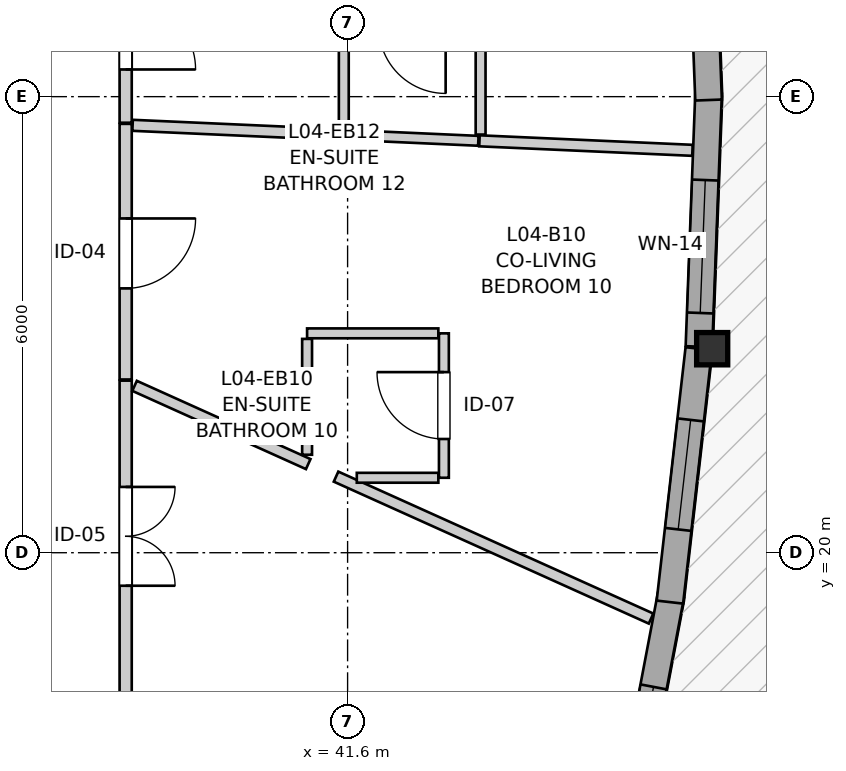
"""IFC4 building model, lengths in metres.
Left out: names, types, materials, properties, quantities, classifications, styles, units other than length and angle.
Written with IfcOpenShell. Run it as: python <this file> out.ifc"""

import sys

from ifc_helpers import new_model, si_unit, direction, frame, frame_2d, origin, origin_2d, place, context, subcontext, project, spatial, rectangle, i_section, extrude, source, transform, mapped, element, fill, save


model = new_model("IFC4")
c1 = context("Model", 3, precision=1e-05, world=origin(), true_north=direction((0.0, 1.0)))
c2 = subcontext(c1, "Body", "Model", "MODEL_VIEW")
j1 = project(units=[si_unit("LENGTHUNIT", "METRE"), si_unit("PLANEANGLEUNIT", "RADIAN")], contexts=[c1])
p1 = place(None, origin())
s1 = spatial("IfcSite", under=j1, at=p1, CompositionType="ELEMENT")
p2 = place(p1, origin())
s2 = spatial("IfcBuilding", under=s1, at=p2, CompositionType="ELEMENT")
p3 = place(p2, frame((0.0, 0.0, 17.4)))
s3 = spatial("IfcBuildingStorey", under=s2, at=p3, CompositionType="ELEMENT", Elevation=17.4)
m1 = source(origin(), c2, "Body", "SweptSolid", [
    extrude(i_section(OverallWidth=0.409, OverallDepth=0.425, WebThickness=0.03, FlangeThickness=0.048, FilletRadius=0.015, at=origin_2d()), origin(), (0.0, 0.0, 1.0), 2.94),
])
p4 = place(p3, frame((46.397, 22.684, 0.0), z_axis=(0.0, 0.0, 1.0), x_axis=(1.0, 0.0, 0.0)))
e1 = element("IfcColumn", 1, at=p4, inside=s3, PredefinedType="PILASTER", context=c2, shape_type="MappedRepresentation", body=[
    mapped(m1, transform((0.0, 0.0, 0.0), x_axis=(1.0, 0.0, 0.0), y_axis=(0.0, 1.0, 0.0), z_axis=(0.0, 0.0, 1.0), scale=1.0)),
])
p5 = place(p3, frame((45.273, 16.379, 0.0), z_axis=(0.0, 0.0, 1.0), x_axis=(0.186712111557, 0.982414671815, 0.0)))
e2 = element("IfcWall", 2, at=p5, inside=s3, PredefinedType="SOLIDWALL", context=c2, shape_type="SweptSolid", body=[
    extrude(rectangle(XDim=3.113, YDim=0.35, at=frame_2d((1.557, 0.0))), origin(), (0.0, 0.0, 1.0), 2.42),
])
p6 = place(p5, frame((0.939, 0.0, 0.82)))
e3 = element("IfcOpeningElement", 3, at=p6, cuts=e2, PredefinedType="OPENING", context=c2, shape_type="SweptSolid", body=[
    extrude(rectangle(XDim=0.95, YDim=1.35, at=frame_2d((0.475, 0.675))), frame((0.0, 0.185, 0.0), z_axis=(0.0, -1.0, 0.0), x_axis=(1.0, 0.0, 0.0)), (0.0, 0.0, 1.0), 0.37),
])
p7 = place(p3, frame((45.841, 19.35, 0.0), z_axis=(0.0, 0.0, 1.0), x_axis=(0.113290074291, 0.993561955324, 0.0)))
e4 = element("IfcWall", 4, at=p7, inside=s3, PredefinedType="SOLIDWALL", context=c2, shape_type="SweptSolid", body=[
    extrude(rectangle(XDim=3.355, YDim=0.35, at=frame_2d((1.678, 0.0))), origin(), (0.0, 0.0, 1.0), 2.42),
])
p8 = place(p7, frame((0.963, 0.0, 0.82)))
e5 = element("IfcOpeningElement", 5, at=p8, cuts=e4, PredefinedType="OPENING", context=c2, shape_type="SweptSolid", body=[
    extrude(rectangle(XDim=1.45, YDim=1.25, at=frame_2d((0.725, 0.625))), frame((0.0, 0.185, 0.0), z_axis=(0.0, -1.0, 0.0), x_axis=(1.0, 0.0, 0.0)), (0.0, 0.0, 1.0), 0.37),
])
p9 = place(p3, frame((46.223, 22.711, 0.0), z_axis=(0.0, 0.0, 1.0), x_axis=(0.037977854684, 0.999278581054, 0.0)))
e6 = element("IfcWall", 6, at=p9, inside=s3, PredefinedType="SOLIDWALL", context=c2, shape_type="SweptSolid", body=[
    extrude(rectangle(XDim=3.336, YDim=0.35, at=frame_2d((1.668, 0.0))), origin(), (0.0, 0.0, 1.0), 2.42),
])
p10 = place(p9, frame((0.444, 0.0, 0.82)))
e7 = element("IfcOpeningElement", 7, at=p10, cuts=e6, PredefinedType="OPENING", context=c2, shape_type="SweptSolid", body=[
    extrude(rectangle(XDim=1.75, YDim=1.3, at=frame_2d((0.875, 0.65))), frame((0.0, 0.185, 0.0), z_axis=(0.0, -1.0, 0.0), x_axis=(1.0, 0.0, 0.0)), (0.0, 0.0, 1.0), 0.37),
])
p11 = place(p3, frame((46.349, 25.955, 0.0), z_axis=(0.0, 0.0, 1.0), x_axis=(-0.038022046735, 0.999276900545, 0.0)))
e8 = element("IfcWall", 8, at=p11, inside=s3, PredefinedType="SOLIDWALL", context=c2, shape_type="SweptSolid", body=[
    extrude(rectangle(XDim=3.056, YDim=0.35, at=frame_2d((1.528, 0.0))), origin(), (0.0, 0.0, 1.0), 2.42),
])
p12 = place(p11, frame((0.808, 0.0, 0.82)))
e9 = element("IfcOpeningElement", 9, at=p12, cuts=e8, PredefinedType="OPENING", context=c2, shape_type="SweptSolid", body=[
    extrude(rectangle(XDim=1.45, YDim=1.25, at=frame_2d((0.725, 0.625))), frame((0.0, 0.185, 0.0), z_axis=(0.0, -1.0, 0.0), x_axis=(1.0, 0.0, 0.0)), (0.0, 0.0, 1.0), 0.37),
])
p13 = place(p3, frame((38.68, 22.264, 0.0), z_axis=(0.0, 0.0, 1.0), x_axis=(0.0, -1.0, 0.0)))
e10 = element("IfcWall", 10, at=p13, inside=s3, PredefinedType="PARTITIONING", context=c2, shape_type="SweptSolid", body=[
    extrude(rectangle(XDim=4.102, YDim=0.16, at=frame_2d((2.051, 0.0))), origin(), (0.0, 0.0, 1.0), 2.94),
])
p14 = place(p13, frame((1.398, 0.0, 0.0)))
e11 = element("IfcOpeningElement", 11, at=p14, cuts=e10, PredefinedType="OPENING", context=c2, shape_type="SweptSolid", body=[
    extrude(rectangle(XDim=1.3, YDim=2.1, at=frame_2d((0.65, 1.05))), frame((0.0, 0.09, 0.0), z_axis=(0.0, -1.0, 0.0), x_axis=(1.0, 0.0, 0.0)), (0.0, 0.0, 1.0), 0.18),
])
p15 = place(p3, frame((38.68, 25.642, 0.0), z_axis=(0.0, 0.0, 1.0), x_axis=(0.0, -1.0, 0.0)))
e12 = element("IfcWall", 12, at=p15, inside=s3, PredefinedType="PARTITIONING", context=c2, shape_type="SweptSolid", body=[
    extrude(rectangle(XDim=3.363, YDim=0.16, at=frame_2d((1.682, 0.0))), origin(), (0.0, 0.0, 1.0), 2.94),
])
p16 = place(p15, frame((1.244, 0.0, 0.0)))
e13 = element("IfcOpeningElement", 13, at=p16, cuts=e12, PredefinedType="OPENING", context=c2, shape_type="SweptSolid", body=[
    extrude(rectangle(XDim=0.92, YDim=2.1, at=frame_2d((0.46, 1.05))), frame((0.0, 0.09, 0.0), z_axis=(0.0, -1.0, 0.0), x_axis=(1.0, 0.0, 0.0)), (0.0, 0.0, 1.0), 0.18),
])
p17 = place(p3, frame((38.68, 27.978, 0.0), z_axis=(0.0, 0.0, 1.0), x_axis=(0.0, -1.0, 0.0)))
e14 = element("IfcWall", 14, at=p17, inside=s3, PredefinedType="PARTITIONING", context=c2, shape_type="SweptSolid", body=[
    extrude(rectangle(XDim=2.321, YDim=0.16, at=frame_2d((1.161, 0.0))), origin(), (0.0, 0.0, 1.0), 2.94),
])
p18 = place(p17, frame((0.7, 0.0, 0.0)))
e15 = element("IfcOpeningElement", 15, at=p18, cuts=e14, PredefinedType="OPENING", context=c2, shape_type="SweptSolid", body=[
    extrude(rectangle(XDim=0.92, YDim=2.1, at=frame_2d((0.46, 1.05))), frame((0.0, 0.09, 0.0), z_axis=(0.0, -1.0, 0.0), x_axis=(1.0, 0.0, 0.0)), (0.0, 0.0, 1.0), 0.18),
])
p19 = place(p3, frame((42.867, 20.986, 0.0), z_axis=(0.0, 0.0, 1.0), x_axis=(0.0, 1.0, 0.0)))
e16 = element("IfcWall", 16, at=p19, inside=s3, PredefinedType="PARTITIONING", context=c2, shape_type="SweptSolid", body=[
    extrude(rectangle(XDim=1.9, YDim=0.13, at=frame_2d((0.95, 0.0))), origin(), (0.0, 0.0, 1.0), 2.508),
])
p20 = place(p19, frame((0.51, 0.0, 0.0)))
e17 = element("IfcOpeningElement", 17, at=p20, cuts=e16, PredefinedType="OPENING", context=c2, shape_type="SweptSolid", body=[
    extrude(rectangle(XDim=0.88, YDim=2.05, at=frame_2d((0.44, 1.025))), frame((0.0, 0.075, 0.0), z_axis=(0.0, -1.0, 0.0), x_axis=(1.0, 0.0, 0.0)), (0.0, 0.0, 1.0), 0.15),
])
p21 = place(p3, frame((41.448, 21.001, 0.0), z_axis=(0.0, 0.0, 1.0), x_axis=(0.911733501253, -0.410782208346, 0.0)))
e18 = element("IfcWall", 18, at=p21, inside=s3, PredefinedType="PARTITIONING", context=c2, shape_type="SweptSolid", body=[
    extrude(rectangle(XDim=4.546, YDim=0.145, at=frame_2d((2.273, 0.0))), origin(), (0.0, 0.0, 1.0), 2.94),
])
p22 = place(p3, frame((38.771, 25.623, 0.0), z_axis=(0.0, 0.0, 1.0), x_axis=(0.999004404192, -0.044611662199, 0.0)))
e19 = element("IfcWall", 19, at=p22, inside=s3, PredefinedType="PARTITIONING", context=c2, shape_type="SweptSolid", body=[
    extrude(rectangle(XDim=2.796, YDim=0.145, at=frame_2d((1.398, 0.0))), origin(), (0.0, 0.0, 1.0), 2.94),
])
p23 = place(p3, frame((43.335, 25.419, 0.0), z_axis=(0.0, 0.0, 1.0), x_axis=(0.999002708223, -0.04464962444, 0.0)))
e20 = element("IfcWall", 20, at=p23, inside=s3, PredefinedType="PARTITIONING", context=c2, shape_type="SweptSolid", body=[
    extrude(rectangle(XDim=2.805, YDim=0.145, at=frame_2d((1.402, 0.0))), origin(), (0.0, 0.0, 1.0), 2.94),
])
p24 = place(p3, frame((38.797, 22.195, 0.0), z_axis=(0.0, 0.0, 1.0), x_axis=(0.911759201305, -0.410725162165, 0.0)))
e21 = element("IfcWall", 21, at=p24, inside=s3, PredefinedType="PARTITIONING", context=c2, shape_type="SweptSolid", body=[
    extrude(rectangle(XDim=2.506, YDim=0.145, at=frame_2d((1.253, 0.0))), origin(), (0.0, 0.0, 1.0), 2.94),
])
p25 = place(p3, frame((41.067, 22.886, 0.0), z_axis=(0.0, 0.0, 1.0), x_axis=(1.0, 0.0, 0.0)))
e22 = element("IfcWall", 22, at=p25, inside=s3, PredefinedType="PARTITIONING", context=c2, shape_type="SweptSolid", body=[
    extrude(rectangle(XDim=1.727, YDim=0.13, at=frame_2d((0.864, 0.0))), origin(), (0.0, 0.0, 1.0), 2.94),
])
p26 = place(p3, frame((41.58, 25.497, 0.0), z_axis=(0.0, 0.0, 1.0), x_axis=(0.998993531001, -0.04485448715, 0.0)))
e23 = element("IfcWall", 23, at=p26, inside=s3, PredefinedType="PARTITIONING", context=c2, shape_type="SweptSolid", body=[
    extrude(rectangle(XDim=1.742, YDim=0.13, at=frame_2d((0.871, 0.0))), origin(), (0.0, 0.0, 1.0), 2.94),
])
p27 = place(p3, frame((41.067, 21.289, 0.0), z_axis=(0.0, 0.0, 1.0), x_axis=(0.0, 1.0, 0.0)))
e24 = element("IfcWall", 24, at=p27, inside=s3, PredefinedType="PARTITIONING", context=c2, shape_type="SweptSolid", body=[
    extrude(rectangle(XDim=1.524, YDim=0.13, at=frame_2d((0.762, 0.0))), origin(), (0.0, 0.0, 1.0), 2.94),
])
p28 = place(p3, frame((43.35, 25.501, 0.0), z_axis=(0.0, 0.0, 1.0), x_axis=(0.0, 1.0, 0.0)))
e25 = element("IfcWall", 25, at=p28, inside=s3, PredefinedType="PARTITIONING", context=c2, shape_type="SweptSolid", body=[
    extrude(rectangle(XDim=1.348, YDim=0.13, at=frame_2d((0.674, 0.0))), origin(), (0.0, 0.0, 1.0), 2.508),
])
p29 = place(p3, frame((41.55, 25.583, 0.0), z_axis=(0.0, 0.0, 1.0), x_axis=(0.0, 1.0, 0.0)))
e26 = element("IfcWall", 26, at=p29, inside=s3, PredefinedType="PARTITIONING", context=c2, shape_type="SweptSolid", body=[
    extrude(rectangle(XDim=1.267, YDim=0.13, at=frame_2d((0.633, 0.0))), origin(), (0.0, 0.0, 1.0), 2.94),
])
p30 = place(p3, frame((41.721, 20.986, 0.0), z_axis=(0.0, 0.0, 1.0), x_axis=(1.0, 0.0, 0.0)))
e27 = element("IfcWall", 27, at=p30, inside=s3, PredefinedType="PARTITIONING", context=c2, shape_type="SweptSolid", body=[
    extrude(rectangle(XDim=1.073, YDim=0.13, at=frame_2d((0.537, 0.0))), origin(), (0.0, 0.0, 1.0), 2.94),
])
m2 = source(origin(), c2, "Body", "SweptSolid", [
    extrude(rectangle(XDim=0.95, YDim=1.35, at=frame_2d((0.475, 0.675))), frame((0.0, 0.03, 0.0), z_axis=(0.0, -1.0, 0.0), x_axis=(1.0, 0.0, 0.0)), (0.0, 0.0, 1.0), 0.06),
])
p31 = place(p6, origin())
e28 = element("IfcWindow", 28, at=p31, inside=s3, PartitioningType="SINGLE_PANEL", PredefinedType="WINDOW", context=c2, shape_type="MappedRepresentation", body=[
    mapped(m2, transform((0.0, 0.0, 0.0), x_axis=(1.0, 0.0, 0.0), y_axis=(0.0, 1.0, 0.0), z_axis=(0.0, 0.0, 1.0), scale=1.0)),
])
fill(e3, e28)
m3 = source(origin(), c2, "Body", "SweptSolid", [
    extrude(rectangle(XDim=1.45, YDim=1.25, at=frame_2d((0.725, 0.625))), frame((0.0, 0.03, 0.0), z_axis=(0.0, -1.0, 0.0), x_axis=(1.0, 0.0, 0.0)), (0.0, 0.0, 1.0), 0.06),
])
p32 = place(p8, origin())
e29 = element("IfcWindow", 29, at=p32, inside=s3, PartitioningType="SINGLE_PANEL", PredefinedType="WINDOW", context=c2, shape_type="MappedRepresentation", body=[
    mapped(m3, transform((0.0, 0.0, 0.0), x_axis=(1.0, 0.0, 0.0), y_axis=(0.0, 1.0, 0.0), z_axis=(0.0, 0.0, 1.0), scale=1.0)),
])
fill(e5, e29)
m4 = source(origin(), c2, "Body", "SweptSolid", [
    extrude(rectangle(XDim=1.75, YDim=1.3, at=frame_2d((0.875, 0.65))), frame((0.0, 0.03, 0.0), z_axis=(0.0, -1.0, 0.0), x_axis=(1.0, 0.0, 0.0)), (0.0, 0.0, 1.0), 0.06),
])
p33 = place(p10, origin())
e30 = element("IfcWindow", 30, at=p33, inside=s3, PartitioningType="SINGLE_PANEL", PredefinedType="WINDOW", context=c2, shape_type="MappedRepresentation", body=[
    mapped(m4, transform((0.0, 0.0, 0.0), x_axis=(1.0, 0.0, 0.0), y_axis=(0.0, 1.0, 0.0), z_axis=(0.0, 0.0, 1.0), scale=1.0)),
])
fill(e7, e30)
m5 = source(origin(), c2, "Body", "SweptSolid", [
    extrude(rectangle(XDim=1.3, YDim=2.1, at=frame_2d((0.65, 1.05))), frame((0.0, 0.025, 0.0), z_axis=(0.0, -1.0, 0.0), x_axis=(1.0, 0.0, 0.0)), (0.0, 0.0, 1.0), 0.05),
])
p34 = place(p14, origin())
e31 = element("IfcDoor", 31, at=p34, inside=s3, OperationType="DOUBLE_DOOR_SINGLE_SWING", PredefinedType="DOOR", context=c2, shape_type="MappedRepresentation", body=[
    mapped(m5, transform((0.0, 0.0, 0.0), x_axis=(1.0, 0.0, 0.0), y_axis=(0.0, 1.0, 0.0), z_axis=(0.0, 0.0, 1.0), scale=1.0)),
])
fill(e11, e31)
m6 = source(origin(), c2, "Body", "SweptSolid", [
    extrude(rectangle(XDim=0.92, YDim=2.1, at=frame_2d((0.46, 1.05))), frame((0.0, 0.025, 0.0), z_axis=(0.0, -1.0, 0.0), x_axis=(1.0, 0.0, 0.0)), (0.0, 0.0, 1.0), 0.05),
])
p35 = place(p16, origin())
e32 = element("IfcDoor", 32, at=p35, inside=s3, OperationType="SINGLE_SWING_LEFT", PredefinedType="DOOR", context=c2, shape_type="MappedRepresentation", body=[
    mapped(m6, transform((0.0, 0.0, 0.0), x_axis=(1.0, 0.0, 0.0), y_axis=(0.0, 1.0, 0.0), z_axis=(0.0, 0.0, 1.0), scale=1.0)),
])
fill(e13, e32)
p36 = place(p18, origin())
e33 = element("IfcDoor", 33, at=p36, inside=s3, OperationType="SINGLE_SWING_RIGHT", PredefinedType="DOOR", context=c2, shape_type="MappedRepresentation", body=[
    mapped(m6, transform((0.0, 0.0, 0.0), x_axis=(1.0, 0.0, 0.0), y_axis=(0.0, 1.0, 0.0), z_axis=(0.0, 0.0, 1.0), scale=1.0)),
])
fill(e15, e33)
m7 = source(origin(), c2, "Body", "SweptSolid", [
    extrude(rectangle(XDim=0.88, YDim=2.05, at=frame_2d((0.44, 1.025))), frame((0.0, 0.025, 0.0), z_axis=(0.0, -1.0, 0.0), x_axis=(1.0, 0.0, 0.0)), (0.0, 0.0, 1.0), 0.05),
])
p37 = place(p20, origin())
e34 = element("IfcDoor", 34, at=p37, inside=s3, OperationType="SINGLE_SWING_RIGHT", PredefinedType="DOOR", context=c2, shape_type="MappedRepresentation", body=[
    mapped(m7, transform((0.0, 0.0, 0.0), x_axis=(1.0, 0.0, 0.0), y_axis=(0.0, 1.0, 0.0), z_axis=(0.0, 0.0, 1.0), scale=1.0)),
])
fill(e17, e34)
save(model, sys.argv[1])
